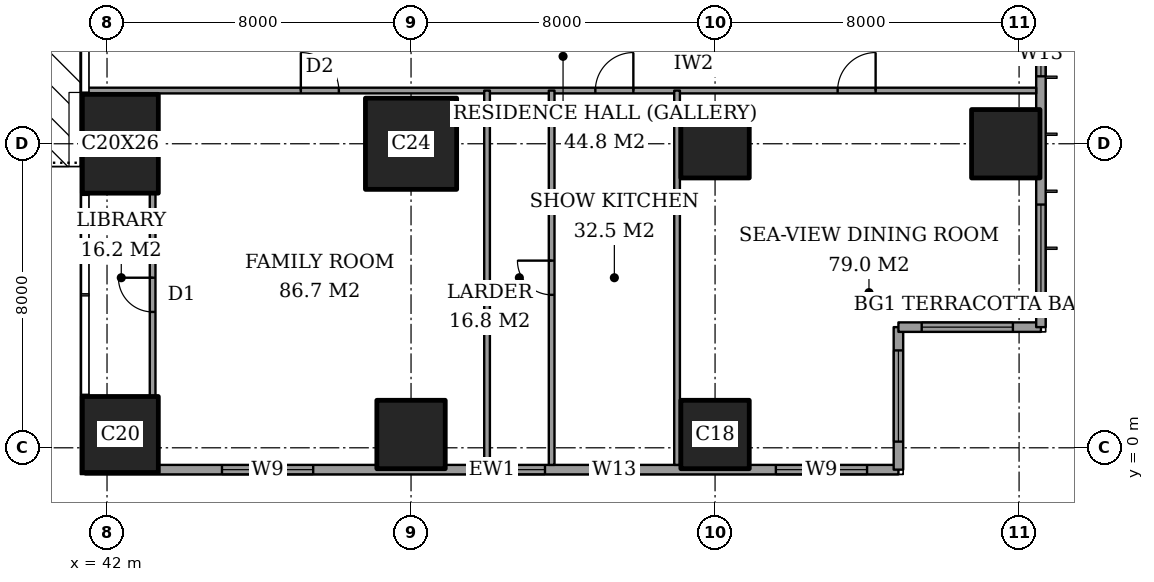
"""IFC4 building model, lengths in metres.
Left out: names, types, materials, properties, quantities, classifications, styles, units other than length and angle.
Written with IfcOpenShell. Run it as: python <this file> out.ifc"""

import sys

from ifc_helpers import new_model, si_unit, direction, frame, frame_2d, origin, origin_2d, place, context, subcontext, project, spatial, rectangle, extrude, element, fill, save


model = new_model("IFC4")
c1 = context("Model", 3, precision=1e-05, world=origin(), true_north=direction((0.0, 1.0)))
c2 = subcontext(c1, "Body", "Model", "MODEL_VIEW")
j1 = project(units=[si_unit("LENGTHUNIT", "METRE"), si_unit("PLANEANGLEUNIT", "RADIAN")], contexts=[c1])
p1 = place(None, origin())
s1 = spatial("IfcSite", under=j1, at=p1, CompositionType="ELEMENT")
p2 = place(p1, origin())
s2 = spatial("IfcBuilding", under=s1, at=p2, CompositionType="ELEMENT")
p3 = place(p2, frame((0.0, 0.0, 182.2)))
s3 = spatial("IfcBuildingStorey", under=s2, at=p3, CompositionType="ELEMENT", Elevation=182.2)
p4 = place(p3, frame((42.35, 0.35, 0.0), z_axis=(0.0, 0.0, 1.0), x_axis=(1.0, 0.0, 0.0)))
e1 = element("IfcColumn", 1, at=p4, inside=s3, PredefinedType="COLUMN", context=c2, shape_type="SweptSolid", body=[
    extrude(rectangle(XDim=2.0, YDim=2.0, at=origin_2d()), origin(), (0.0, 0.0, 1.0), 3.6),
])
p5 = place(p3, frame((42.35, 8.0, 0.0), z_axis=(0.0, 0.0, 1.0), x_axis=(1.0, 0.0, 0.0)))
e2 = element("IfcColumn", 2, at=p5, inside=s3, PredefinedType="COLUMN", context=c2, shape_type="SweptSolid", body=[
    extrude(rectangle(XDim=2.0, YDim=2.6, at=origin_2d()), origin(), (0.0, 0.0, 1.0), 3.6),
])
p6 = place(p3, frame((50.0, 0.35, 0.0), z_axis=(0.0, 0.0, 1.0), x_axis=(1.0, 0.0, 0.0)))
e3 = element("IfcColumn", 3, at=p6, inside=s3, PredefinedType="COLUMN", context=c2, shape_type="SweptSolid", body=[
    extrude(rectangle(XDim=1.8, YDim=1.8, at=origin_2d()), origin(), (0.0, 0.0, 1.0), 3.6),
])
p7 = place(p3, frame((50.0, 8.0, 0.0), z_axis=(0.0, 0.0, 1.0), x_axis=(1.0, 0.0, 0.0)))
e4 = element("IfcColumn", 4, at=p7, inside=s3, PredefinedType="COLUMN", context=c2, shape_type="SweptSolid", body=[
    extrude(rectangle(XDim=2.4, YDim=2.4, at=origin_2d()), origin(), (0.0, 0.0, 1.0), 3.6),
])
for number, where, z_axis, x_axis in (
    (5, (58.0, 0.35, 0.0), (0.0, 0.0, 1.0), (1.0, 0.0, 0.0)),
    (6, (58.0, 8.0, 0.0), (0.0, 0.0, 1.0), (1.0, 0.0, 0.0)),
    (7, (65.65, 8.0, 0.0), (0.0, 0.0, 1.0), (1.0, 0.0, 0.0)),
):
    element("IfcColumn", number, at=place(p3, frame(where, z_axis=z_axis, x_axis=x_axis)), inside=s3, PredefinedType="COLUMN", context=c2, shape_type="SweptSolid", body=[
        extrude(rectangle(XDim=1.8, YDim=1.8, at=origin_2d()), origin(), (0.0, 0.0, 1.0), 3.6),
    ])
p8 = place(p3, frame((41.425, -0.575, 0.0), z_axis=(0.0, 0.0, 1.0), x_axis=(1.0, 0.0, 0.0)))
e8 = element("IfcWall", 8, at=p8, inside=s3, PredefinedType="SOLIDWALL", context=c2, shape_type="SweptSolid", body=[
    extrude(rectangle(XDim=21.4, YDim=0.25, at=frame_2d((10.7, 0.0))), origin(), (0.0, 0.0, 1.0), 3.6),
])
p9 = place(p8, frame((3.6, 0.0, 0.2)))
e9 = element("IfcOpeningElement", 9, at=p9, cuts=e8, PredefinedType="OPENING", context=c2, shape_type="SweptSolid", body=[
    extrude(rectangle(XDim=2.4, YDim=2.4, at=frame_2d((1.2, 1.2))), frame((0.0, 0.135, 0.0), z_axis=(0.0, -1.0, 0.0), x_axis=(1.0, 0.0, 0.0)), (0.0, 0.0, 1.0), 0.27),
])
p10 = place(p8, frame((10.9, 0.0, 0.2)))
e10 = element("IfcOpeningElement", 10, at=p10, cuts=e8, PredefinedType="OPENING", context=c2, shape_type="SweptSolid", body=[
    extrude(rectangle(XDim=1.2, YDim=2.4, at=frame_2d((0.6, 1.2))), frame((0.0, 0.135, 0.0), z_axis=(0.0, -1.0, 0.0), x_axis=(1.0, 0.0, 0.0)), (0.0, 0.0, 1.0), 0.27),
])
p11 = place(p8, frame((13.325, 0.0, 0.2)))
e11 = element("IfcOpeningElement", 11, at=p11, cuts=e8, PredefinedType="OPENING", context=c2, shape_type="SweptSolid", body=[
    extrude(rectangle(XDim=1.2, YDim=2.4, at=frame_2d((0.6, 1.2))), frame((0.0, 0.135, 0.0), z_axis=(0.0, -1.0, 0.0), x_axis=(1.0, 0.0, 0.0)), (0.0, 0.0, 1.0), 0.27),
])
p12 = place(p8, frame((18.175, 0.0, 0.2)))
e12 = element("IfcOpeningElement", 12, at=p12, cuts=e8, PredefinedType="OPENING", context=c2, shape_type="SweptSolid", body=[
    extrude(rectangle(XDim=2.4, YDim=2.4, at=frame_2d((1.2, 1.2))), frame((0.0, 0.135, 0.0), z_axis=(0.0, -1.0, 0.0), x_axis=(1.0, 0.0, 0.0)), (0.0, 0.0, 1.0), 0.27),
])
p13 = place(p3, frame((62.825, -0.575, 0.0), z_axis=(0.0, 0.0, 1.0), x_axis=(0.0, 1.0, 0.0)))
e13 = element("IfcWall", 13, at=p13, inside=s3, PredefinedType="SOLIDWALL", context=c2, shape_type="SweptSolid", body=[
    extrude(rectangle(XDim=3.75, YDim=0.25, at=frame_2d((1.875, 0.0))), origin(), (0.0, 0.0, 1.0), 3.6),
])
p14 = place(p13, frame((0.738, 0.0, 0.2)))
e14 = element("IfcOpeningElement", 14, at=p14, cuts=e13, PredefinedType="OPENING", context=c2, shape_type="SweptSolid", body=[
    extrude(rectangle(XDim=2.4, YDim=2.4, at=frame_2d((1.2, 1.2))), frame((0.0, 0.135, 0.0), z_axis=(0.0, -1.0, 0.0), x_axis=(1.0, 0.0, 0.0)), (0.0, 0.0, 1.0), 0.27),
])
p15 = place(p3, frame((62.825, 3.175, 0.0), z_axis=(0.0, 0.0, 1.0), x_axis=(1.0, 0.0, 0.0)))
e15 = element("IfcWall", 15, at=p15, inside=s3, PredefinedType="SOLIDWALL", context=c2, shape_type="SweptSolid", body=[
    extrude(rectangle(XDim=3.75, YDim=0.25, at=frame_2d((1.875, 0.0))), origin(), (0.0, 0.0, 1.0), 3.6),
])
p16 = place(p15, frame((0.613, 0.0, 0.2)))
e16 = element("IfcOpeningElement", 16, at=p16, cuts=e15, PredefinedType="OPENING", context=c2, shape_type="SweptSolid", body=[
    extrude(rectangle(XDim=2.4, YDim=2.4, at=frame_2d((1.2, 1.2))), frame((0.0, 0.135, 0.0), z_axis=(0.0, -1.0, 0.0), x_axis=(1.0, 0.0, 0.0)), (0.0, 0.0, 1.0), 0.27),
])
p17 = place(p3, frame((66.575, 3.175, 0.0), z_axis=(0.0, 0.0, 1.0), x_axis=(0.0, 1.0, 0.0)))
e17 = element("IfcWall", 17, at=p17, inside=s3, PredefinedType="SOLIDWALL", context=c2, shape_type="SweptSolid", body=[
    extrude(rectangle(XDim=41.65, YDim=0.25, at=frame_2d((20.825, 0.0))), origin(), (0.0, 0.0, 1.0), 3.6),
])
p18 = place(p17, frame((0.825, 0.0, 0.2)))
e18 = element("IfcOpeningElement", 18, at=p18, cuts=e17, PredefinedType="OPENING", context=c2, shape_type="SweptSolid", body=[
    extrude(rectangle(XDim=2.4, YDim=2.4, at=frame_2d((1.2, 1.2))), frame((0.0, 0.135, 0.0), z_axis=(0.0, -1.0, 0.0), x_axis=(1.0, 0.0, 0.0)), (0.0, 0.0, 1.0), 0.27),
])
p19 = place(p17, frame((6.6, 0.0, 0.2)))
e19 = element("IfcOpeningElement", 19, at=p19, cuts=e17, PredefinedType="OPENING", context=c2, shape_type="SweptSolid", body=[
    extrude(rectangle(XDim=1.2, YDim=2.4, at=frame_2d((0.6, 1.2))), frame((0.0, 0.135, 0.0), z_axis=(0.0, -1.0, 0.0), x_axis=(1.0, 0.0, 0.0)), (0.0, 0.0, 1.0), 0.27),
])
p20 = place(p17, frame((8.775, 0.0, 0.2)))
e20 = element("IfcOpeningElement", 20, at=p20, cuts=e17, PredefinedType="OPENING", context=c2, shape_type="SweptSolid", body=[
    extrude(rectangle(XDim=2.4, YDim=2.4, at=frame_2d((1.2, 1.2))), frame((0.0, 0.135, 0.0), z_axis=(0.0, -1.0, 0.0), x_axis=(1.0, 0.0, 0.0)), (0.0, 0.0, 1.0), 0.27),
])
p21 = place(p17, frame((15.675, 0.0, 0.2)))
e21 = element("IfcOpeningElement", 21, at=p21, cuts=e17, PredefinedType="OPENING", context=c2, shape_type="SweptSolid", body=[
    extrude(rectangle(XDim=2.4, YDim=2.4, at=frame_2d((1.2, 1.2))), frame((0.0, 0.135, 0.0), z_axis=(0.0, -1.0, 0.0), x_axis=(1.0, 0.0, 0.0)), (0.0, 0.0, 1.0), 0.27),
])
p22 = place(p17, frame((23.575, 0.0, 0.2)))
e22 = element("IfcOpeningElement", 22, at=p22, cuts=e17, PredefinedType="OPENING", context=c2, shape_type="SweptSolid", body=[
    extrude(rectangle(XDim=2.4, YDim=2.4, at=frame_2d((1.2, 1.2))), frame((0.0, 0.135, 0.0), z_axis=(0.0, -1.0, 0.0), x_axis=(1.0, 0.0, 0.0)), (0.0, 0.0, 1.0), 0.27),
])
p23 = place(p17, frame((30.775, 0.0, 0.2)))
e23 = element("IfcOpeningElement", 23, at=p23, cuts=e17, PredefinedType="OPENING", context=c2, shape_type="SweptSolid", body=[
    extrude(rectangle(XDim=2.4, YDim=2.4, at=frame_2d((1.2, 1.2))), frame((0.0, 0.135, 0.0), z_axis=(0.0, -1.0, 0.0), x_axis=(1.0, 0.0, 0.0)), (0.0, 0.0, 1.0), 0.27),
])
p24 = place(p17, frame((34.55, 0.0, 0.2)))
e24 = element("IfcOpeningElement", 24, at=p24, cuts=e17, PredefinedType="OPENING", context=c2, shape_type="SweptSolid", body=[
    extrude(rectangle(XDim=1.2, YDim=2.4, at=frame_2d((0.6, 1.2))), frame((0.0, 0.135, 0.0), z_axis=(0.0, -1.0, 0.0), x_axis=(1.0, 0.0, 0.0)), (0.0, 0.0, 1.0), 0.27),
])
p25 = place(p17, frame((38.425, 0.0, 0.2)))
e25 = element("IfcOpeningElement", 25, at=p25, cuts=e17, PredefinedType="OPENING", context=c2, shape_type="SweptSolid", body=[
    extrude(rectangle(XDim=2.4, YDim=2.4, at=frame_2d((1.2, 1.2))), frame((0.0, 0.135, 0.0), z_axis=(0.0, -1.0, 0.0), x_axis=(1.0, 0.0, 0.0)), (0.0, 0.0, 1.0), 0.27),
])
p26 = place(p3, frame((41.439, 9.4, 0.0), z_axis=(0.0, 0.0, 1.0), x_axis=(1.0, 0.0, 0.0)))
e26 = element("IfcWall", 26, at=p26, inside=s3, PredefinedType="PARTITIONING", context=c2, shape_type="SweptSolid", body=[
    extrude(rectangle(XDim=25.011, YDim=0.15, at=frame_2d((12.505, 0.0))), origin(), (0.0, 0.0, 1.0), 3.35),
])
p27 = place(p26, frame((19.786, 0.0, 0.0)))
e27 = element("IfcOpeningElement", 27, at=p27, cuts=e26, PredefinedType="OPENING", context=c2, shape_type="SweptSolid", body=[
    extrude(rectangle(XDim=1.0, YDim=2.1, at=frame_2d((0.5, 1.05))), frame((0.0, 0.085, 0.0), z_axis=(0.0, -1.0, 0.0), x_axis=(1.0, 0.0, 0.0)), (0.0, 0.0, 1.0), 0.17),
])
p28 = place(p26, frame((13.411, 0.0, 0.0)))
e28 = element("IfcOpeningElement", 28, at=p28, cuts=e26, PredefinedType="OPENING", context=c2, shape_type="SweptSolid", body=[
    extrude(rectangle(XDim=1.0, YDim=2.1, at=frame_2d((0.5, 1.05))), frame((0.0, 0.085, 0.0), z_axis=(0.0, -1.0, 0.0), x_axis=(1.0, 0.0, 0.0)), (0.0, 0.0, 1.0), 0.17),
])
p29 = place(p26, frame((5.661, 0.0, 0.0)))
e29 = element("IfcOpeningElement", 29, at=p29, cuts=e26, PredefinedType="OPENING", context=c2, shape_type="SweptSolid", body=[
    extrude(rectangle(XDim=1.0, YDim=2.1, at=frame_2d((0.5, 1.05))), frame((0.0, 0.085, 0.0), z_axis=(0.0, -1.0, 0.0), x_axis=(1.0, 0.0, 0.0)), (0.0, 0.0, 1.0), 0.17),
])
p30 = place(p3, frame((43.2, 1.35, 0.0), z_axis=(0.0, 0.0, 1.0), x_axis=(0.0, 1.0, 0.0)))
e30 = element("IfcWall", 30, at=p30, inside=s3, PredefinedType="PARTITIONING", context=c2, shape_type="SweptSolid", body=[
    extrude(rectangle(XDim=5.35, YDim=0.15, at=frame_2d((2.675, 0.0))), origin(), (0.0, 0.0, 1.0), 3.35),
])
p31 = place(p30, frame((2.225, 0.0, 0.0)))
e31 = element("IfcOpeningElement", 31, at=p31, cuts=e30, PredefinedType="OPENING", context=c2, shape_type="SweptSolid", body=[
    extrude(rectangle(XDim=0.9, YDim=2.1, at=frame_2d((0.45, 1.05))), frame((0.0, 0.085, 0.0), z_axis=(0.0, -1.0, 0.0), x_axis=(1.0, 0.0, 0.0)), (0.0, 0.0, 1.0), 0.17),
])
p32 = place(p3, frame((52.0, -0.45, 0.0), z_axis=(0.0, 0.0, 1.0), x_axis=(0.0, 1.0, 0.0)))
e32 = element("IfcWall", 32, at=p32, inside=s3, PredefinedType="PARTITIONING", context=c2, shape_type="SweptSolid", body=[
    extrude(rectangle(XDim=9.85, YDim=0.15, at=frame_2d((4.925, 0.0))), origin(), (0.0, 0.0, 1.0), 3.35),
])
p33 = place(p3, frame((53.7, -0.45, 0.0), z_axis=(0.0, 0.0, 1.0), x_axis=(0.0, 1.0, 0.0)))
e33 = element("IfcWall", 33, at=p33, inside=s3, PredefinedType="PARTITIONING", context=c2, shape_type="SweptSolid", body=[
    extrude(rectangle(XDim=9.85, YDim=0.15, at=frame_2d((4.925, 0.0))), origin(), (0.0, 0.0, 1.0), 3.35),
])
p34 = place(p33, frame((4.475, 0.0, 0.0)))
e34 = element("IfcOpeningElement", 34, at=p34, cuts=e33, PredefinedType="OPENING", context=c2, shape_type="SweptSolid", body=[
    extrude(rectangle(XDim=0.9, YDim=2.1, at=frame_2d((0.45, 1.05))), frame((0.0, 0.085, 0.0), z_axis=(0.0, -1.0, 0.0), x_axis=(1.0, 0.0, 0.0)), (0.0, 0.0, 1.0), 0.17),
])
p35 = place(p3, frame((57.0, -0.45, 0.0), z_axis=(0.0, 0.0, 1.0), x_axis=(0.0, 1.0, 0.0)))
e35 = element("IfcWall", 35, at=p35, inside=s3, PredefinedType="PARTITIONING", context=c2, shape_type="SweptSolid", body=[
    extrude(rectangle(XDim=9.85, YDim=0.15, at=frame_2d((4.925, 0.0))), origin(), (0.0, 0.0, 1.0), 3.35),
])
p36 = place(p9, origin())
e36 = element("IfcWindow", 36, at=p36, inside=s3, PartitioningType="SINGLE_PANEL", PredefinedType="WINDOW", context=c2, shape_type="SweptSolid", body=[
    extrude(rectangle(XDim=2.4, YDim=2.4, at=frame_2d((1.2, 1.2))), frame((0.0, 0.03, 0.0), z_axis=(0.0, -1.0, 0.0), x_axis=(1.0, 0.0, 0.0)), (0.0, 0.0, 1.0), 0.06),
])
fill(e9, e36)
p37 = place(p10, origin())
e37 = element("IfcWindow", 37, at=p37, inside=s3, PartitioningType="SINGLE_PANEL", PredefinedType="WINDOW", context=c2, shape_type="SweptSolid", body=[
    extrude(rectangle(XDim=1.2, YDim=2.4, at=frame_2d((0.6, 1.2))), frame((0.0, 0.03, 0.0), z_axis=(0.0, -1.0, 0.0), x_axis=(1.0, 0.0, 0.0)), (0.0, 0.0, 1.0), 0.06),
])
fill(e10, e37)
p38 = place(p11, origin())
e38 = element("IfcWindow", 38, at=p38, inside=s3, PartitioningType="SINGLE_PANEL", PredefinedType="WINDOW", context=c2, shape_type="SweptSolid", body=[
    extrude(rectangle(XDim=1.2, YDim=2.4, at=frame_2d((0.6, 1.2))), frame((0.0, 0.03, 0.0), z_axis=(0.0, -1.0, 0.0), x_axis=(1.0, 0.0, 0.0)), (0.0, 0.0, 1.0), 0.06),
])
fill(e11, e38)
p39 = place(p12, origin())
e39 = element("IfcWindow", 39, at=p39, inside=s3, PartitioningType="SINGLE_PANEL", PredefinedType="WINDOW", context=c2, shape_type="SweptSolid", body=[
    extrude(rectangle(XDim=2.4, YDim=2.4, at=frame_2d((1.2, 1.2))), frame((0.0, 0.03, 0.0), z_axis=(0.0, -1.0, 0.0), x_axis=(1.0, 0.0, 0.0)), (0.0, 0.0, 1.0), 0.06),
])
fill(e12, e39)
p40 = place(p14, origin())
e40 = element("IfcWindow", 40, at=p40, inside=s3, PartitioningType="SINGLE_PANEL", PredefinedType="WINDOW", context=c2, shape_type="SweptSolid", body=[
    extrude(rectangle(XDim=2.4, YDim=2.4, at=frame_2d((1.2, 1.2))), frame((0.0, 0.03, 0.0), z_axis=(0.0, -1.0, 0.0), x_axis=(1.0, 0.0, 0.0)), (0.0, 0.0, 1.0), 0.06),
])
fill(e14, e40)
p41 = place(p16, origin())
e41 = element("IfcWindow", 41, at=p41, inside=s3, PartitioningType="SINGLE_PANEL", PredefinedType="WINDOW", context=c2, shape_type="SweptSolid", body=[
    extrude(rectangle(XDim=2.4, YDim=2.4, at=frame_2d((1.2, 1.2))), frame((0.0, 0.03, 0.0), z_axis=(0.0, -1.0, 0.0), x_axis=(1.0, 0.0, 0.0)), (0.0, 0.0, 1.0), 0.06),
])
fill(e16, e41)
p42 = place(p18, origin())
e42 = element("IfcWindow", 42, at=p42, inside=s3, PartitioningType="SINGLE_PANEL", PredefinedType="WINDOW", context=c2, shape_type="SweptSolid", body=[
    extrude(rectangle(XDim=2.4, YDim=2.4, at=frame_2d((1.2, 1.2))), frame((0.0, 0.03, 0.0), z_axis=(0.0, -1.0, 0.0), x_axis=(1.0, 0.0, 0.0)), (0.0, 0.0, 1.0), 0.06),
])
fill(e18, e42)
p43 = place(p19, origin())
e43 = element("IfcWindow", 43, at=p43, inside=s3, PartitioningType="SINGLE_PANEL", PredefinedType="WINDOW", context=c2, shape_type="SweptSolid", body=[
    extrude(rectangle(XDim=1.2, YDim=2.4, at=frame_2d((0.6, 1.2))), frame((0.0, 0.03, 0.0), z_axis=(0.0, -1.0, 0.0), x_axis=(1.0, 0.0, 0.0)), (0.0, 0.0, 1.0), 0.06),
])
fill(e19, e43)
p44 = place(p27, origin())
e44 = element("IfcDoor", 44, at=p44, inside=s3, OperationType="SINGLE_SWING_LEFT", PredefinedType="DOOR", context=c2, shape_type="SweptSolid", body=[
    extrude(rectangle(XDim=1.0, YDim=2.1, at=frame_2d((0.5, 1.05))), frame((0.0, 0.025, 0.0), z_axis=(0.0, -1.0, 0.0), x_axis=(1.0, 0.0, 0.0)), (0.0, 0.0, 1.0), 0.05),
])
fill(e27, e44)
p45 = place(p28, origin())
e45 = element("IfcDoor", 45, at=p45, inside=s3, OperationType="SINGLE_SWING_LEFT", PredefinedType="DOOR", context=c2, shape_type="SweptSolid", body=[
    extrude(rectangle(XDim=1.0, YDim=2.1, at=frame_2d((0.5, 1.05))), frame((0.0, 0.025, 0.0), z_axis=(0.0, -1.0, 0.0), x_axis=(1.0, 0.0, 0.0)), (0.0, 0.0, 1.0), 0.05),
])
fill(e28, e45)
p46 = place(p34, origin())
e46 = element("IfcDoor", 46, at=p46, inside=s3, OperationType="SINGLE_SWING_LEFT", PredefinedType="DOOR", context=c2, shape_type="SweptSolid", body=[
    extrude(rectangle(XDim=0.9, YDim=2.1, at=frame_2d((0.45, 1.05))), frame((0.0, 0.025, 0.0), z_axis=(0.0, -1.0, 0.0), x_axis=(1.0, 0.0, 0.0)), (0.0, 0.0, 1.0), 0.05),
])
fill(e34, e46)
p47 = place(p29, origin())
e47 = element("IfcDoor", 47, at=p47, inside=s3, OperationType="SINGLE_SWING_RIGHT", PredefinedType="DOOR", context=c2, shape_type="SweptSolid", body=[
    extrude(rectangle(XDim=1.0, YDim=2.1, at=frame_2d((0.5, 1.05))), frame((0.0, 0.025, 0.0), z_axis=(0.0, -1.0, 0.0), x_axis=(1.0, 0.0, 0.0)), (0.0, 0.0, 1.0), 0.05),
])
fill(e29, e47)
p48 = place(p31, origin())
e48 = element("IfcDoor", 48, at=p48, inside=s3, OperationType="SINGLE_SWING_LEFT", PredefinedType="DOOR", context=c2, shape_type="SweptSolid", body=[
    extrude(rectangle(XDim=0.9, YDim=2.1, at=frame_2d((0.45, 1.05))), frame((0.0, 0.025, 0.0), z_axis=(0.0, -1.0, 0.0), x_axis=(1.0, 0.0, 0.0)), (0.0, 0.0, 1.0), 0.05),
])
fill(e31, e48)
save(model, sys.argv[1])
